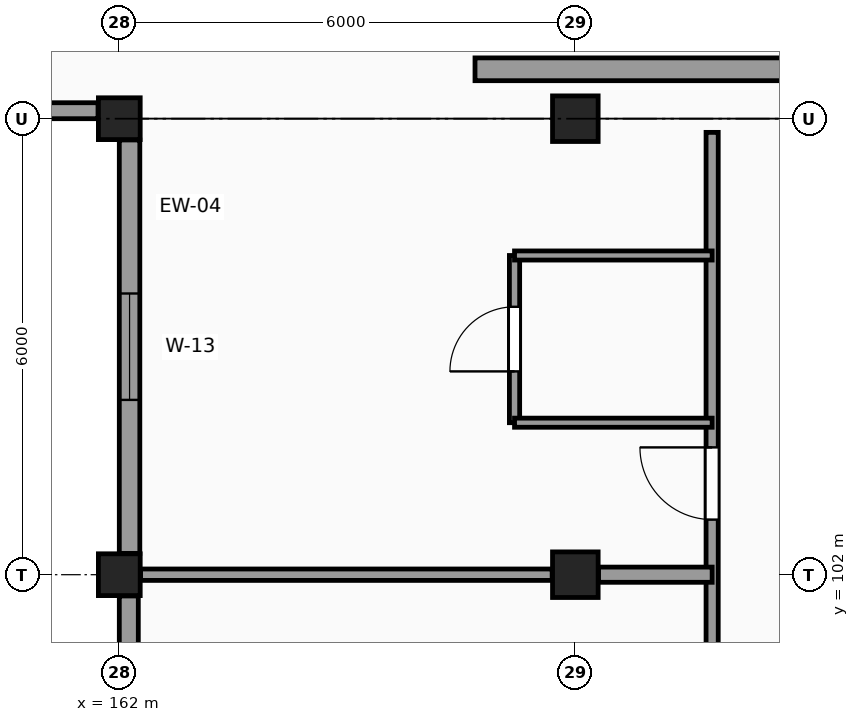
"""IFC4 building model, lengths in metres.
Left out: names, types, materials, properties, quantities, classifications, styles, units other than length and angle.
Written with IfcOpenShell. Run it as: python <this file> out.ifc"""

import sys

from ifc_helpers import new_model, si_unit, direction, frame, frame_2d, origin, origin_2d, place, context, subcontext, project, spatial, rectangle, extrude, element, fill, save


model = new_model("IFC4")
c1 = context("Model", 3, precision=1e-05, world=origin(), true_north=direction((0.0, 1.0)))
c2 = subcontext(c1, "Body", "Model", "MODEL_VIEW")
j1 = project(units=[si_unit("LENGTHUNIT", "METRE"), si_unit("PLANEANGLEUNIT", "RADIAN")], contexts=[c1])
p1 = place(None, origin())
s1 = spatial("IfcSite", under=j1, at=p1, CompositionType="ELEMENT")
p2 = place(p1, origin())
s2 = spatial("IfcBuilding", under=s1, at=p2, CompositionType="ELEMENT")
p3 = place(p2, frame((0.0, 0.0, 28.2)))
s3 = spatial("IfcBuildingStorey", under=s2, at=p3, CompositionType="ELEMENT", Elevation=28.2)
for number, where, z_axis, x_axis in (
    (1, (162.0, 102.0, 0.0), (0.0, 0.0, 1.0), (1.0, 0.0, 0.0)),
    (2, (162.0, 108.0, 0.0), (0.0, 0.0, 1.0), (1.0, 0.0, 0.0)),
):
    element("IfcColumn", number, at=place(p3, frame(where, z_axis=z_axis, x_axis=x_axis)), inside=s3, PredefinedType="COLUMN", context=c2, shape_type="SweptSolid", body=[
        extrude(rectangle(XDim=0.55, YDim=0.55, at=origin_2d()), origin(), (0.0, 0.0, 1.0), 3.3),
    ])
for number, where, z_axis, x_axis in (
    (3, (168.0, 102.0, 0.0), (0.0, 0.0, 1.0), (1.0, 0.0, 0.0)),
    (4, (168.0, 108.0, 0.0), (0.0, 0.0, 1.0), (1.0, 0.0, 0.0)),
):
    element("IfcColumn", number, at=place(p3, frame(where, z_axis=z_axis, x_axis=x_axis)), inside=s3, PredefinedType="COLUMN", context=c2, shape_type="SweptSolid", body=[
        extrude(rectangle(XDim=0.6, YDim=0.6, at=origin_2d()), origin(), (0.0, 0.0, 1.0), 3.3),
    ])
p4 = place(p3, frame((156.305, 108.105, 0.0), z_axis=(0.0, 0.0, 1.0), x_axis=(1.0, 0.0, 0.0)))
e5 = element("IfcWall", 5, at=p4, inside=s3, PredefinedType="SOLIDWALL", context=c2, shape_type="SweptSolid", body=[
    extrude(rectangle(XDim=5.415, YDim=0.21, at=frame_2d((2.708, 0.0))), origin(), (0.0, 0.0, 1.0), 3.08),
])
p5 = place(p3, frame((162.135, 107.72, 0.0), z_axis=(0.0, 0.0, 1.0), x_axis=(0.0, -1.0, 0.0)))
e6 = element("IfcWall", 6, at=p5, inside=s3, PredefinedType="SOLIDWALL", context=c2, shape_type="SweptSolid", body=[
    extrude(rectangle(XDim=5.44, YDim=0.27, at=frame_2d((2.72, 0.0))), origin(), (0.0, 0.0, 1.0), 2.43),
])
p6 = place(p5, frame((2.02, 0.0, 0.8)))
e7 = element("IfcOpeningElement", 7, at=p6, cuts=e6, PredefinedType="OPENING", context=c2, shape_type="SweptSolid", body=[
    extrude(rectangle(XDim=1.4, YDim=1.4, at=frame_2d((0.7, 0.7))), frame((0.0, 0.145, 0.0), z_axis=(0.0, -1.0, 0.0), x_axis=(1.0, 0.0, 0.0)), (0.0, 0.0, 1.0), 0.29),
])
p7 = place(p3, frame((162.125, 101.72, 0.0), z_axis=(0.0, 0.0, 1.0), x_axis=(0.0, -1.0, 0.0)))
e8 = element("IfcWall", 8, at=p7, inside=s3, PredefinedType="SOLIDWALL", context=c2, shape_type="SweptSolid", body=[
    extrude(rectangle(XDim=5.44, YDim=0.25, at=frame_2d((2.72, 0.0))), origin(), (0.0, 0.0, 1.0), 2.43),
])
p8 = place(p7, frame((2.02, 0.0, 0.8)))
e9 = element("IfcOpeningElement", 9, at=p8, cuts=e8, PredefinedType="OPENING", context=c2, shape_type="SweptSolid", body=[
    extrude(rectangle(XDim=1.4, YDim=1.4, at=frame_2d((0.7, 0.7))), frame((0.0, 0.135, 0.0), z_axis=(0.0, -1.0, 0.0), x_axis=(1.0, 0.0, 0.0)), (0.0, 0.0, 1.0), 0.27),
])
p9 = place(p3, frame((166.68, 108.65, 0.0), z_axis=(0.0, 0.0, 1.0), x_axis=(1.0, 0.0, 0.0)))
e10 = element("IfcWall", 10, at=p9, inside=s3, PredefinedType="SHEAR", context=c2, shape_type="SweptSolid", body=[
    extrude(rectangle(XDim=4.24, YDim=0.3, at=frame_2d((2.12, 0.0))), origin(), (0.0, 0.0, 1.0), 3.3),
])
p10 = place(p3, frame((167.2, 104.0, 0.0), z_axis=(0.0, 0.0, 1.0), x_axis=(0.0, 1.0, 0.0)))
e11 = element("IfcWall", 11, at=p10, inside=s3, PredefinedType="PARTITIONING", context=c2, shape_type="SweptSolid", body=[
    extrude(rectangle(XDim=2.2, YDim=0.135, at=frame_2d((1.1, 0.0))), origin(), (0.0, 0.0, 1.0), 3.08),
])
p11 = place(p10, frame((0.675, 0.0, 0.0)))
e12 = element("IfcOpeningElement", 12, at=p11, cuts=e11, PredefinedType="OPENING", context=c2, shape_type="SweptSolid", body=[
    extrude(rectangle(XDim=0.85, YDim=2.1, at=frame_2d((0.425, 1.05))), frame((0.0, 0.078, 0.0), z_axis=(0.0, -1.0, 0.0), x_axis=(1.0, 0.0, 0.0)), (0.0, 0.0, 1.0), 0.155),
])
p12 = place(p3, frame((169.8, 42.275, 0.0), z_axis=(0.0, 0.0, 1.0), x_axis=(0.0, 1.0, 0.0)))
e13 = element("IfcWall", 13, at=p12, inside=s3, PredefinedType="PARTITIONING", context=c2, shape_type="SweptSolid", body=[
    extrude(rectangle(XDim=65.545, YDim=0.16, at=frame_2d((32.772, 0.0))), origin(), (0.0, 0.0, 1.0), 3.08),
])
p13 = place(p12, frame((50.125, 0.0, 0.0)))
e14 = element("IfcOpeningElement", 14, at=p13, cuts=e13, PredefinedType="OPENING", context=c2, shape_type="SweptSolid", body=[
    extrude(rectangle(XDim=1.2, YDim=2.2, at=frame_2d((0.6, 1.1))), frame((0.0, 0.09, 0.0), z_axis=(0.0, -1.0, 0.0), x_axis=(1.0, 0.0, 0.0)), (0.0, 0.0, 1.0), 0.18),
])
p14 = place(p12, frame((0.4, 0.0, 0.0)))
e15 = element("IfcOpeningElement", 15, at=p14, cuts=e13, PredefinedType="OPENING", context=c2, shape_type="SweptSolid", body=[
    extrude(rectangle(XDim=0.95, YDim=2.1, at=frame_2d((0.475, 1.05))), frame((0.0, 0.09, 0.0), z_axis=(0.0, -1.0, 0.0), x_axis=(1.0, 0.0, 0.0)), (0.0, 0.0, 1.0), 0.18),
])
p15 = place(p12, frame((6.45, 0.0, 0.0)))
e16 = element("IfcOpeningElement", 16, at=p15, cuts=e13, PredefinedType="OPENING", context=c2, shape_type="SweptSolid", body=[
    extrude(rectangle(XDim=0.95, YDim=2.1, at=frame_2d((0.475, 1.05))), frame((0.0, 0.09, 0.0), z_axis=(0.0, -1.0, 0.0), x_axis=(1.0, 0.0, 0.0)), (0.0, 0.0, 1.0), 0.18),
])
p16 = place(p12, frame((12.45, 0.0, 0.0)))
e17 = element("IfcOpeningElement", 17, at=p16, cuts=e13, PredefinedType="OPENING", context=c2, shape_type="SweptSolid", body=[
    extrude(rectangle(XDim=0.95, YDim=2.1, at=frame_2d((0.475, 1.05))), frame((0.0, 0.09, 0.0), z_axis=(0.0, -1.0, 0.0), x_axis=(1.0, 0.0, 0.0)), (0.0, 0.0, 1.0), 0.18),
])
p17 = place(p12, frame((18.45, 0.0, 0.0)))
e18 = element("IfcOpeningElement", 18, at=p17, cuts=e13, PredefinedType="OPENING", context=c2, shape_type="SweptSolid", body=[
    extrude(rectangle(XDim=0.95, YDim=2.1, at=frame_2d((0.475, 1.05))), frame((0.0, 0.09, 0.0), z_axis=(0.0, -1.0, 0.0), x_axis=(1.0, 0.0, 0.0)), (0.0, 0.0, 1.0), 0.18),
])
p18 = place(p12, frame((24.45, 0.0, 0.0)))
e19 = element("IfcOpeningElement", 19, at=p18, cuts=e13, PredefinedType="OPENING", context=c2, shape_type="SweptSolid", body=[
    extrude(rectangle(XDim=0.95, YDim=2.1, at=frame_2d((0.475, 1.05))), frame((0.0, 0.09, 0.0), z_axis=(0.0, -1.0, 0.0), x_axis=(1.0, 0.0, 0.0)), (0.0, 0.0, 1.0), 0.18),
])
p19 = place(p12, frame((30.45, 0.0, 0.0)))
e20 = element("IfcOpeningElement", 20, at=p19, cuts=e13, PredefinedType="OPENING", context=c2, shape_type="SweptSolid", body=[
    extrude(rectangle(XDim=0.95, YDim=2.1, at=frame_2d((0.475, 1.05))), frame((0.0, 0.09, 0.0), z_axis=(0.0, -1.0, 0.0), x_axis=(1.0, 0.0, 0.0)), (0.0, 0.0, 1.0), 0.18),
])
p20 = place(p12, frame((54.45, 0.0, 0.0)))
e21 = element("IfcOpeningElement", 21, at=p20, cuts=e13, PredefinedType="OPENING", context=c2, shape_type="SweptSolid", body=[
    extrude(rectangle(XDim=0.95, YDim=2.1, at=frame_2d((0.475, 1.05))), frame((0.0, 0.09, 0.0), z_axis=(0.0, -1.0, 0.0), x_axis=(1.0, 0.0, 0.0)), (0.0, 0.0, 1.0), 0.18),
])
p21 = place(p12, frame((60.45, 0.0, 0.0)))
e22 = element("IfcOpeningElement", 22, at=p21, cuts=e13, PredefinedType="OPENING", context=c2, shape_type="SweptSolid", body=[
    extrude(rectangle(XDim=0.95, YDim=2.1, at=frame_2d((0.475, 1.05))), frame((0.0, 0.09, 0.0), z_axis=(0.0, -1.0, 0.0), x_axis=(1.0, 0.0, 0.0)), (0.0, 0.0, 1.0), 0.18),
])
p22 = place(p3, frame((162.28, 102.0, 0.0), z_axis=(0.0, 0.0, 1.0), x_axis=(1.0, 0.0, 0.0)))
e23 = element("IfcWall", 23, at=p22, inside=s3, PredefinedType="PARTITIONING", context=c2, shape_type="SweptSolid", body=[
    extrude(rectangle(XDim=5.415, YDim=0.15, at=frame_2d((2.708, 0.0))), origin(), (0.0, 0.0, 1.0), 2.79),
])
p23 = place(p3, frame((168.305, 102.0, 0.0), z_axis=(0.0, 0.0, 1.0), x_axis=(1.0, 0.0, 0.0)))
e24 = element("IfcWall", 24, at=p23, inside=s3, PredefinedType="PARTITIONING", context=c2, shape_type="SweptSolid", body=[
    extrude(rectangle(XDim=1.495, YDim=0.2, at=frame_2d((0.748, 0.0))), origin(), (0.0, 0.0, 1.0), 2.28),
])
for number, where, z_axis, x_axis in (
    (25, (167.2, 104.0, 0.0), (0.0, 0.0, 1.0), (1.0, 0.0, 0.0)),
    (26, (167.2, 106.2, 0.0), (0.0, 0.0, 1.0), (1.0, 0.0, 0.0)),
):
    element("IfcWall", number, at=place(p3, frame(where, z_axis=z_axis, x_axis=x_axis)), inside=s3, PredefinedType="PARTITIONING", context=c2, shape_type="SweptSolid", body=[
        extrude(rectangle(XDim=2.6, YDim=0.12, at=frame_2d((1.3, 0.0))), origin(), (0.0, 0.0, 1.0), 3.08),
    ])
p24 = place(p6, origin())
e27 = element("IfcWindow", 27, at=p24, inside=s3, PartitioningType="SINGLE_PANEL", PredefinedType="WINDOW", context=c2, shape_type="SweptSolid", body=[
    extrude(rectangle(XDim=1.4, YDim=1.4, at=frame_2d((0.7, 0.7))), frame((0.0, 0.03, 0.0), z_axis=(0.0, -1.0, 0.0), x_axis=(1.0, 0.0, 0.0)), (0.0, 0.0, 1.0), 0.06),
])
fill(e7, e27)
p25 = place(p11, origin())
e28 = element("IfcDoor", 28, at=p25, inside=s3, OperationType="SINGLE_SWING_LEFT", PredefinedType="DOOR", context=c2, shape_type="SweptSolid", body=[
    extrude(rectangle(XDim=0.85, YDim=2.1, at=frame_2d((0.425, 1.05))), frame((0.0, 0.025, 0.0), z_axis=(0.0, -1.0, 0.0), x_axis=(1.0, 0.0, 0.0)), (0.0, 0.0, 1.0), 0.05),
])
fill(e12, e28)
p26 = place(p21, origin())
e29 = element("IfcDoor", 29, at=p26, inside=s3, OperationType="SINGLE_SWING_RIGHT", PredefinedType="DOOR", context=c2, shape_type="SweptSolid", body=[
    extrude(rectangle(XDim=0.95, YDim=2.1, at=frame_2d((0.475, 1.05))), frame((0.0, 0.025, 0.0), z_axis=(0.0, -1.0, 0.0), x_axis=(1.0, 0.0, 0.0)), (0.0, 0.0, 1.0), 0.05),
])
fill(e22, e29)
save(model, sys.argv[1])
